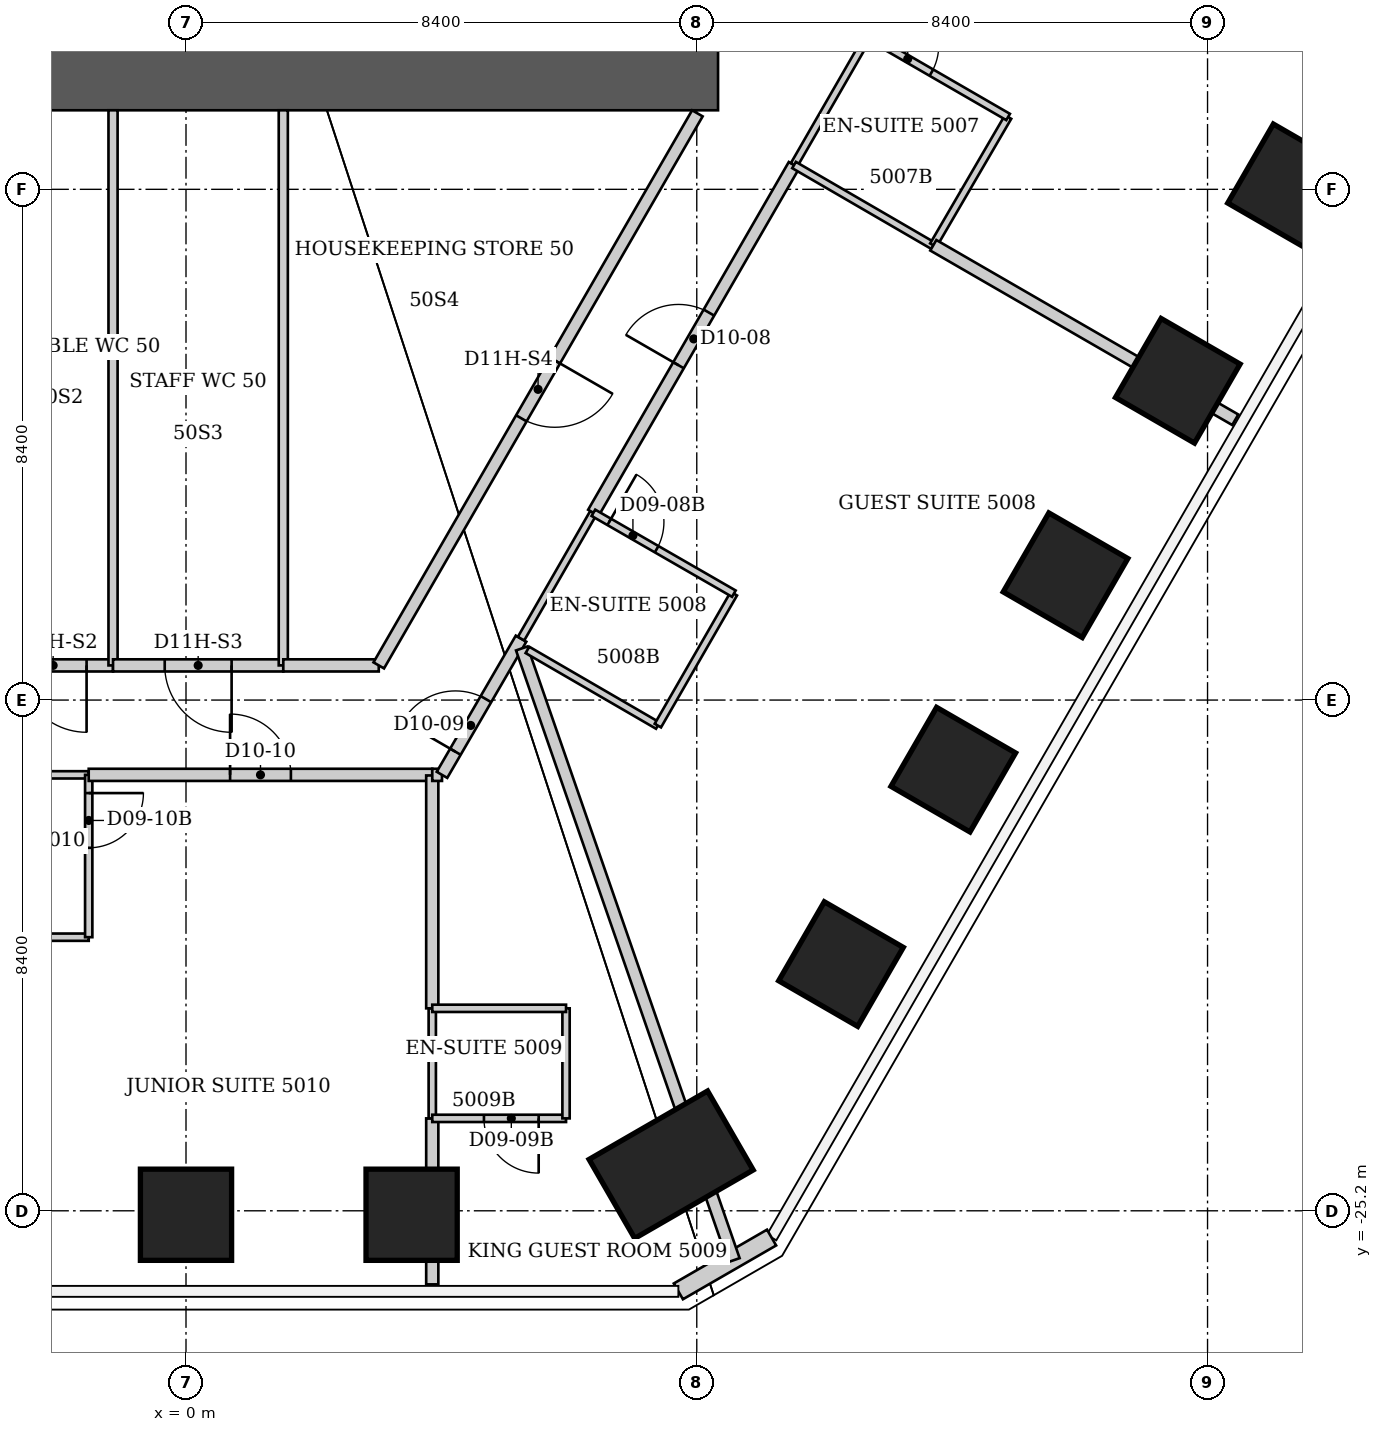
"""IFC4 building model, lengths in metres.
Left out: names, types, materials, properties, quantities, classifications, styles, units other than length and angle.
Written with IfcOpenShell. Run it as: python <this file> out.ifc"""

import sys

from ifc_helpers import new_model, si_unit, direction, frame, frame_2d, origin, origin_2d, place, context, subcontext, project, spatial, rectangle, extrude, element, fill, save


model = new_model("IFC4")
c1 = context("Model", 3, precision=1e-05, world=origin(), true_north=direction((0.0, 1.0)))
c2 = subcontext(c1, "Body", "Model", "MODEL_VIEW")
j1 = project(units=[si_unit("LENGTHUNIT", "METRE"), si_unit("PLANEANGLEUNIT", "RADIAN")], contexts=[c1])
p1 = place(None, origin())
s1 = spatial("IfcSite", under=j1, at=p1, CompositionType="ELEMENT")
p2 = place(p1, origin())
s2 = spatial("IfcBuilding", under=s1, at=p2, CompositionType="ELEMENT")
p3 = place(p2, frame((0.0, 0.0, 202.2)))
s3 = spatial("IfcBuildingStorey", under=s2, at=p3, CompositionType="ELEMENT", Elevation=202.2)
for number, where, z_axis, x_axis in (
    (1, (18.157, -8.351, 0.0), (0.0, 0.0, 1.0), (0.866, -0.5, 0.0)),
    (2, (16.311, -11.549, 0.0), (0.0, 0.0, 1.0), (0.866, -0.5, 0.0)),
    (3, (14.465, -14.747, 0.0), (0.0, 0.0, 1.0), (0.866, -0.5, 0.0)),
    (4, (12.618, -17.945, 0.0), (0.0, 0.0, 1.0), (0.866, -0.5, 0.0)),
    (5, (10.772, -21.142, 0.0), (0.0, 0.0, 1.0), (0.866, -0.5, 0.0)),
):
    element("IfcColumn", number, at=place(p3, frame(where, z_axis=z_axis, x_axis=x_axis)), inside=s3, PredefinedType="COLUMN", context=c2, shape_type="SweptSolid", body=[
        extrude(rectangle(XDim=1.5, YDim=1.5, at=origin_2d()), origin(), (0.0, 0.0, 1.0), 3.8),
    ])
p4 = place(p3, frame((7.979, -24.442, 0.0), z_axis=(0.0, 0.0, 1.0), x_axis=(0.5, -0.866025403784, 0.0)))
e6 = element("IfcColumn", 6, at=p4, inside=s3, PredefinedType="COLUMN", context=c2, shape_type="SweptSolid", body=[
    extrude(rectangle(XDim=1.5, YDim=2.25, at=origin_2d()), origin(), (0.0, 0.0, 1.0), 3.8),
])
for number, where, z_axis, x_axis in (
    (7, (3.71, -25.265, 0.0), (0.0, 0.0, 1.0), (0.0, -1.0, 0.0)),
    (8, (0.0, -25.265, 0.0), (0.0, 0.0, 1.0), (0.0, -1.0, 0.0)),
):
    element("IfcColumn", number, at=place(p3, frame(where, z_axis=z_axis, x_axis=x_axis)), inside=s3, PredefinedType="COLUMN", context=c2, shape_type="SweptSolid", body=[
        extrude(rectangle(XDim=1.5, YDim=1.5, at=origin_2d()), origin(), (0.0, 0.0, 1.0), 3.8),
    ])
p5 = place(p3, frame((-8.75, -6.6, 0.0), z_axis=(0.0, 0.0, 1.0), x_axis=(1.0, 0.0, 0.0)))
e9 = element("IfcWall", 9, at=p5, inside=s3, PredefinedType="SHEAR", context=c2, shape_type="SweptSolid", body=[
    extrude(rectangle(XDim=17.5, YDim=1.0, at=frame_2d((8.75, 0.0))), origin(), (0.0, 0.0, 1.0), 3.8),
])
p6 = place(p3, frame((9.63, -25.64, 0.0), z_axis=(0.0, 0.0, 1.0), x_axis=(-0.866036293601, -0.499981137809, 0.0)))
e10 = element("IfcWall", 10, at=p6, inside=s3, PredefinedType="SOLIDWALL", context=c2, shape_type="SweptSolid", body=[
    extrude(rectangle(XDim=1.77, YDim=0.3, at=frame_2d((0.885, 0.0))), origin(), (0.0, 0.0, 1.0), 3.64),
])
for number, where, z_axis, x_axis in (
    (11, (-4.05, -20.7, 0.0), (0.0, 0.0, 1.0), (1.0, 0.0, 0.0)),
    (12, (-4.05, -18.03, 0.0), (0.0, 0.0, 1.0), (1.0, 0.0, 0.0)),
):
    element("IfcWall", number, at=place(p3, frame(where, z_axis=z_axis, x_axis=x_axis)), inside=s3, PredefinedType="PARTITIONING", context=c2, shape_type="SweptSolid", body=[
        extrude(rectangle(XDim=2.45, YDim=0.12, at=frame_2d((1.225, 0.0))), origin(), (0.0, 0.0, 1.0), 3.64),
    ])
p7 = place(p3, frame((-1.6, -20.7, 0.0), z_axis=(0.0, 0.0, 1.0), x_axis=(0.0, 1.0, 0.0)))
e13 = element("IfcWall", 13, at=p7, inside=s3, PredefinedType="PARTITIONING", context=c2, shape_type="SweptSolid", body=[
    extrude(rectangle(XDim=2.67, YDim=0.12, at=frame_2d((1.335, 0.0))), origin(), (0.0, 0.0, 1.0), 3.64),
])
p8 = place(p7, frame((1.47, 0.0, 0.0)))
e14 = element("IfcOpeningElement", 14, at=p8, cuts=e13, PredefinedType="OPENING", context=c2, shape_type="SweptSolid", body=[
    extrude(rectangle(XDim=0.9, YDim=2.03, at=frame_2d((0.45, 1.015))), frame((0.0, 0.06, 0.0), z_axis=(0.0, -1.0, 0.0), x_axis=(1.0, 0.0, 0.0)), (0.0, 0.0, 1.0), 0.12),
])
p9 = place(p3, frame((-1.6, -18.03, 0.0), z_axis=(0.0, 0.0, 1.0), x_axis=(1.0, 0.0, 0.0)))
e15 = element("IfcWall", 15, at=p9, inside=s3, PredefinedType="PARTITIONING", context=c2, shape_type="SweptSolid", body=[
    extrude(rectangle(XDim=5.65, YDim=0.2, at=frame_2d((2.825, 0.0))), origin(), (0.0, 0.0, 1.0), 3.64),
])
p10 = place(p9, frame((2.325, 0.0, 0.0)))
e16 = element("IfcOpeningElement", 16, at=p10, cuts=e15, PredefinedType="OPENING", context=c2, shape_type="SweptSolid", body=[
    extrude(rectangle(XDim=1.0, YDim=2.13, at=frame_2d((0.5, 1.065))), frame((0.0, 0.1, 0.0), z_axis=(0.0, -1.0, 0.0), x_axis=(1.0, 0.0, 0.0)), (0.0, 0.0, 1.0), 0.2),
])
p11 = place(p3, frame((-1.2, -16.23, 0.0), z_axis=(0.0, 0.0, 1.0), x_axis=(-1.0, 0.0, 0.0)))
e17 = element("IfcWall", 17, at=p11, inside=s3, PredefinedType="PARTITIONING", context=c2, shape_type="SweptSolid", body=[
    extrude(rectangle(XDim=1.97, YDim=0.2, at=frame_2d((0.985, 0.0))), origin(), (0.0, 0.0, 1.0), 3.64),
])
p12 = place(p11, frame((0.435, 0.0, 0.0)))
e18 = element("IfcOpeningElement", 18, at=p12, cuts=e17, PredefinedType="OPENING", context=c2, shape_type="SweptSolid", body=[
    extrude(rectangle(XDim=1.1, YDim=2.2, at=frame_2d((0.55, 1.1))), frame((0.0, 0.1, 0.0), z_axis=(0.0, -1.0, 0.0), x_axis=(1.0, 0.0, 0.0)), (0.0, 0.0, 1.0), 0.2),
])
p13 = place(p3, frame((-1.2, -7.1, 0.0), z_axis=(0.0, 0.0, 1.0), x_axis=(0.0, -1.0, 0.0)))
e19 = element("IfcWall", 19, at=p13, inside=s3, PredefinedType="PARTITIONING", context=c2, shape_type="SweptSolid", body=[
    extrude(rectangle(XDim=9.13, YDim=0.15, at=frame_2d((4.565, 0.0))), origin(), (0.0, 0.0, 1.0), 3.64),
])
p14 = place(p3, frame((1.6, -16.23, 0.0), z_axis=(0.0, 0.0, 1.0), x_axis=(-1.0, 0.0, 0.0)))
e20 = element("IfcWall", 20, at=p14, inside=s3, PredefinedType="PARTITIONING", context=c2, shape_type="SweptSolid", body=[
    extrude(rectangle(XDim=2.8, YDim=0.2, at=frame_2d((1.4, 0.0))), origin(), (0.0, 0.0, 1.0), 3.64),
])
p15 = place(p14, frame((0.85, 0.0, 0.0)))
e21 = element("IfcOpeningElement", 21, at=p15, cuts=e20, PredefinedType="OPENING", context=c2, shape_type="SweptSolid", body=[
    extrude(rectangle(XDim=1.1, YDim=2.2, at=frame_2d((0.55, 1.1))), frame((0.0, 0.1, 0.0), z_axis=(0.0, -1.0, 0.0), x_axis=(1.0, 0.0, 0.0)), (0.0, 0.0, 1.0), 0.2),
])
p16 = place(p3, frame((1.6, -7.1, 0.0), z_axis=(0.0, 0.0, 1.0), x_axis=(0.0, -1.0, 0.0)))
e22 = element("IfcWall", 22, at=p16, inside=s3, PredefinedType="PARTITIONING", context=c2, shape_type="SweptSolid", body=[
    extrude(rectangle(XDim=9.13, YDim=0.15, at=frame_2d((4.565, 0.0))), origin(), (0.0, 0.0, 1.0), 3.64),
])
p17 = place(p3, frame((3.17, -16.23, 0.0), z_axis=(0.0, 0.0, 1.0), x_axis=(-1.0, 0.0, 0.0)))
e23 = element("IfcWall", 23, at=p17, inside=s3, PredefinedType="PARTITIONING", context=c2, shape_type="SweptSolid", body=[
    extrude(rectangle(XDim=1.57, YDim=0.2, at=frame_2d((0.785, 0.0))), origin(), (0.0, 0.0, 1.0), 3.64),
])
p18 = place(p3, frame((4.05, -26.41, 0.0), z_axis=(0.0, 0.0, 1.0), x_axis=(0.0, 1.0, 0.0)))
e24 = element("IfcWall", 24, at=p18, inside=s3, PredefinedType="PARTITIONING", context=c2, shape_type="SweptSolid", body=[
    extrude(rectangle(XDim=2.73, YDim=0.2, at=frame_2d((1.365, 0.0))), origin(), (0.0, 0.0, 1.0), 3.64),
])
p19 = place(p3, frame((4.05, -23.68, 0.0), z_axis=(0.0, 0.0, 1.0), x_axis=(0.0, 1.0, 0.0)))
e25 = element("IfcWall", 25, at=p19, inside=s3, PredefinedType="PARTITIONING", context=c2, shape_type="SweptSolid", body=[
    extrude(rectangle(XDim=1.81, YDim=0.12, at=frame_2d((0.905, 0.0))), origin(), (0.0, 0.0, 1.0), 3.64),
])
p20 = place(p3, frame((4.05, -23.68, 0.0), z_axis=(0.0, 0.0, 1.0), x_axis=(1.0, 0.0, 0.0)))
e26 = element("IfcWall", 26, at=p20, inside=s3, PredefinedType="PARTITIONING", context=c2, shape_type="SweptSolid", body=[
    extrude(rectangle(XDim=2.2, YDim=0.12, at=frame_2d((1.1, 0.0))), origin(), (0.0, 0.0, 1.0), 3.64),
])
p21 = place(p20, frame((0.85, 0.0, 0.0)))
e27 = element("IfcOpeningElement", 27, at=p21, cuts=e26, PredefinedType="OPENING", context=c2, shape_type="SweptSolid", body=[
    extrude(rectangle(XDim=0.9, YDim=2.03, at=frame_2d((0.45, 1.015))), frame((0.0, 0.06, 0.0), z_axis=(0.0, -1.0, 0.0), x_axis=(1.0, 0.0, 0.0)), (0.0, 0.0, 1.0), 0.12),
])
p22 = place(p3, frame((4.05, -21.87, 0.0), z_axis=(0.0, 0.0, 1.0), x_axis=(0.0, 1.0, 0.0)))
e28 = element("IfcWall", 28, at=p22, inside=s3, PredefinedType="PARTITIONING", context=c2, shape_type="SweptSolid", body=[
    extrude(rectangle(XDim=3.83, YDim=0.2, at=frame_2d((1.915, 0.0))), origin(), (0.0, 0.0, 1.0), 3.64),
])
p23 = place(p3, frame((4.05, -18.03, 0.0), z_axis=(0.0, 0.0, 1.0), x_axis=(1.0, 0.0, 0.0)))
e29 = element("IfcWall", 29, at=p23, inside=s3, PredefinedType="PARTITIONING", context=c2, shape_type="SweptSolid", body=[
    extrude(rectangle(XDim=0.16, YDim=0.2, at=frame_2d((0.08, 0.0))), origin(), (0.0, 0.0, 1.0), 3.64),
])
p24 = place(p3, frame((5.51, -15.79, 0.0), z_axis=(0.0, 0.0, 1.0), x_axis=(-0.501964949025, -0.864887963814, 0.0)))
e30 = element("IfcWall", 30, at=p24, inside=s3, PredefinedType="PARTITIONING", context=c2, shape_type="SweptSolid", body=[
    extrude(rectangle(XDim=2.59, YDim=0.2, at=frame_2d((1.295, 0.0))), origin(), (0.0, 0.0, 1.0), 3.64),
])
p25 = place(p24, frame((1.15, 0.0, 0.0)))
e31 = element("IfcOpeningElement", 31, at=p25, cuts=e30, PredefinedType="OPENING", context=c2, shape_type="SweptSolid", body=[
    extrude(rectangle(XDim=1.0, YDim=2.13, at=frame_2d((0.5, 1.065))), frame((0.0, 0.1, 0.0), z_axis=(0.0, -1.0, 0.0), x_axis=(1.0, 0.0, 0.0)), (0.0, 0.0, 1.0), 0.2),
])
p26 = place(p3, frame((5.51, -15.79, 0.0), z_axis=(0.0, 0.0, 1.0), x_axis=(0.49836161924, 0.866969259241, 0.0)))
e32 = element("IfcWall", 32, at=p26, inside=s3, PredefinedType="PARTITIONING", context=c2, shape_type="SweptSolid", body=[
    extrude(rectangle(XDim=2.388, YDim=0.12, at=frame_2d((1.194, 0.0))), origin(), (0.0, 0.0, 1.0), 3.64),
])
p27 = place(p3, frame((5.522, -15.951, 0.0), z_axis=(0.0, 0.0, 1.0), x_axis=(0.327588517074, -0.944820492729, 0.0)))
e33 = element("IfcWall", 33, at=p27, inside=s3, PredefinedType="PARTITIONING", context=c2, shape_type="SweptSolid", body=[
    extrude(rectangle(XDim=10.648, YDim=0.2, at=frame_2d((5.324, 0.0))), origin(), (0.0, 0.0, 1.0), 3.64),
])
p28 = place(p3, frame((5.615, -15.975, 0.0), z_axis=(0.0, 0.0, 1.0), x_axis=(0.864873056518, -0.501990633487, 0.0)))
e34 = element("IfcWall", 34, at=p28, inside=s3, PredefinedType="PARTITIONING", context=c2, shape_type="SweptSolid", body=[
    extrude(rectangle(XDim=2.48, YDim=0.12, at=frame_2d((1.24, 0.0))), origin(), (0.0, 0.0, 1.0), 3.038),
])
p29 = place(p3, frame((6.25, -23.68, 0.0), z_axis=(0.0, 0.0, 1.0), x_axis=(0.0, 1.0, 0.0)))
e35 = element("IfcWall", 35, at=p29, inside=s3, PredefinedType="PARTITIONING", context=c2, shape_type="SweptSolid", body=[
    extrude(rectangle(XDim=1.81, YDim=0.12, at=frame_2d((0.905, 0.0))), origin(), (0.0, 0.0, 1.0), 3.64),
])
p30 = place(p3, frame((6.25, -21.87, 0.0), z_axis=(0.0, 0.0, 1.0), x_axis=(-1.0, 0.0, 0.0)))
e36 = element("IfcWall", 36, at=p30, inside=s3, PredefinedType="PARTITIONING", context=c2, shape_type="SweptSolid", body=[
    extrude(rectangle(XDim=2.2, YDim=0.12, at=frame_2d((1.1, 0.0))), origin(), (0.0, 0.0, 1.0), 3.64),
])
p31 = place(p3, frame((6.7, -13.72, 0.0), z_axis=(0.0, 0.0, 1.0), x_axis=(0.499729921425, 0.866181277581, 0.0)))
e37 = element("IfcWall", 37, at=p31, inside=s3, PredefinedType="PARTITIONING", context=c2, shape_type="SweptSolid", body=[
    extrude(rectangle(XDim=6.604, YDim=0.2, at=frame_2d((3.302, 0.0))), origin(), (0.0, 0.0, 1.0), 3.64),
])
p32 = place(p31, frame((2.802, 0.0, 0.0)))
e38 = element("IfcOpeningElement", 38, at=p32, cuts=e37, PredefinedType="OPENING", context=c2, shape_type="SweptSolid", body=[
    extrude(rectangle(XDim=1.0, YDim=2.13, at=frame_2d((0.5, 1.065))), frame((0.0, 0.1, 0.0), z_axis=(0.0, -1.0, 0.0), x_axis=(1.0, 0.0, 0.0)), (0.0, 0.0, 1.0), 0.2),
])
p33 = place(p3, frame((7.76, -17.22, 0.0), z_axis=(0.0, 0.0, 1.0), x_axis=(0.499159685399, 0.866510016372, 0.0)))
e39 = element("IfcWall", 39, at=p33, inside=s3, PredefinedType="PARTITIONING", context=c2, shape_type="SweptSolid", body=[
    extrude(rectangle(XDim=2.504, YDim=0.12, at=frame_2d((1.252, 0.0))), origin(), (0.0, 0.0, 1.0), 3.64),
])
p34 = place(p3, frame((8.41, -7.15, 0.0), z_axis=(0.0, 0.0, 1.0), x_axis=(-0.499828628176, -0.866124322748, 0.0)))
e40 = element("IfcWall", 40, at=p34, inside=s3, PredefinedType="PARTITIONING", context=c2, shape_type="SweptSolid", body=[
    extrude(rectangle(XDim=10.484, YDim=0.2, at=frame_2d((5.242, 0.0))), origin(), (0.0, 0.0, 1.0), 3.64),
])
p35 = place(p34, frame((4.692, 0.0, 0.0)))
e41 = element("IfcOpeningElement", 41, at=p35, cuts=e40, PredefinedType="OPENING", context=c2, shape_type="SweptSolid", body=[
    extrude(rectangle(XDim=1.1, YDim=2.2, at=frame_2d((0.55, 1.1))), frame((0.0, 0.1, 0.0), z_axis=(0.0, -1.0, 0.0), x_axis=(1.0, 0.0, 0.0)), (0.0, 0.0, 1.0), 0.2),
])
p36 = place(p3, frame((9.01, -15.05, 0.0), z_axis=(0.0, 0.0, 1.0), x_axis=(-0.866615255992, 0.498976951453, 0.0)))
e42 = element("IfcWall", 42, at=p36, inside=s3, PredefinedType="PARTITIONING", context=c2, shape_type="SweptSolid", body=[
    extrude(rectangle(XDim=2.666, YDim=0.12, at=frame_2d((1.333, 0.0))), origin(), (0.0, 0.0, 1.0), 3.64),
])
p37 = place(p36, frame((1.466, 0.0, 0.0)))
e43 = element("IfcOpeningElement", 43, at=p37, cuts=e42, PredefinedType="OPENING", context=c2, shape_type="SweptSolid", body=[
    extrude(rectangle(XDim=0.9, YDim=2.03, at=frame_2d((0.45, 1.015))), frame((0.0, 0.06, 0.0), z_axis=(0.0, -1.0, 0.0), x_axis=(1.0, 0.0, 0.0)), (0.0, 0.0, 1.0), 0.12),
])
p38 = place(p3, frame((9.999, -8.0, 0.0), z_axis=(0.0, 0.0, 1.0), x_axis=(0.49917796633, 0.866499485245, 0.0)))
e44 = element("IfcWall", 44, at=p38, inside=s3, PredefinedType="PARTITIONING", context=c2, shape_type="SweptSolid", body=[
    extrude(rectangle(XDim=2.446, YDim=0.12, at=frame_2d((1.223, 0.0))), origin(), (0.0, 0.0, 1.0), 3.64),
])
p39 = place(p3, frame((12.29, -9.33, 0.0), z_axis=(0.0, 0.0, 1.0), x_axis=(-0.864726954997, 0.502242265546, 0.0)))
e45 = element("IfcWall", 45, at=p39, inside=s3, PredefinedType="PARTITIONING", context=c2, shape_type="SweptSolid", body=[
    extrude(rectangle(XDim=2.648, YDim=0.12, at=frame_2d((1.324, 0.0))), origin(), (0.0, 0.0, 1.0), 3.038),
])
p40 = place(p3, frame((12.29, -9.32, 0.0), z_axis=(0.0, 0.0, 1.0), x_axis=(0.503591322258, 0.863942000453, 0.0)))
e46 = element("IfcWall", 46, at=p40, inside=s3, PredefinedType="PARTITIONING", context=c2, shape_type="SweptSolid", body=[
    extrude(rectangle(XDim=2.442, YDim=0.12, at=frame_2d((1.221, 0.0))), origin(), (0.0, 0.0, 1.0), 3.64),
])
p41 = place(p3, frame((12.29, -9.32, 0.0), z_axis=(0.0, 0.0, 1.0), x_axis=(0.865820408554, -0.500354894182, 0.0)))
e47 = element("IfcWall", 47, at=p41, inside=s3, PredefinedType="PARTITIONING", context=c2, shape_type="SweptSolid", body=[
    extrude(rectangle(XDim=5.736, YDim=0.2, at=frame_2d((2.868, 0.0))), origin(), (0.0, 0.0, 1.0), 3.038),
])
p42 = place(p3, frame((13.52, -7.21, 0.0), z_axis=(0.0, 0.0, 1.0), x_axis=(-0.865675724273, 0.500605174168, 0.0)))
e48 = element("IfcWall", 48, at=p42, inside=s3, PredefinedType="PARTITIONING", context=c2, shape_type="SweptSolid", body=[
    extrude(rectangle(XDim=2.657, YDim=0.12, at=frame_2d((1.329, 0.0))), origin(), (0.0, 0.0, 1.0), 3.64),
])
p43 = place(p42, frame((1.457, 0.0, 0.0)))
e49 = element("IfcOpeningElement", 49, at=p43, cuts=e48, PredefinedType="OPENING", context=c2, shape_type="SweptSolid", body=[
    extrude(rectangle(XDim=0.9, YDim=2.03, at=frame_2d((0.45, 1.015))), frame((0.0, 0.06, 0.0), z_axis=(0.0, -1.0, 0.0), x_axis=(1.0, 0.0, 0.0)), (0.0, 0.0, 1.0), 0.12),
])
p44 = place(p43, origin())
e50 = element("IfcDoor", 50, at=p44, inside=s3, OperationType="SINGLE_SWING_RIGHT", PredefinedType="DOOR", context=c2, shape_type="SweptSolid", body=[
    extrude(rectangle(XDim=0.9, YDim=2.03, at=frame_2d((0.45, 1.015))), frame((0.0, 0.025, 0.0), z_axis=(0.0, -1.0, 0.0), x_axis=(1.0, 0.0, 0.0)), (0.0, 0.0, 1.0), 0.05),
])
fill(e49, e50)
p45 = place(p32, origin())
e51 = element("IfcDoor", 51, at=p45, inside=s3, OperationType="SINGLE_SWING_LEFT", PredefinedType="DOOR", context=c2, shape_type="SweptSolid", body=[
    extrude(rectangle(XDim=1.0, YDim=2.13, at=frame_2d((0.5, 1.065))), frame((0.0, 0.025, 0.0), z_axis=(0.0, -1.0, 0.0), x_axis=(1.0, 0.0, 0.0)), (0.0, 0.0, 1.0), 0.05),
])
fill(e38, e51)
p46 = place(p37, origin())
e52 = element("IfcDoor", 52, at=p46, inside=s3, OperationType="SINGLE_SWING_RIGHT", PredefinedType="DOOR", context=c2, shape_type="SweptSolid", body=[
    extrude(rectangle(XDim=0.9, YDim=2.03, at=frame_2d((0.45, 1.015))), frame((0.0, 0.025, 0.0), z_axis=(0.0, -1.0, 0.0), x_axis=(1.0, 0.0, 0.0)), (0.0, 0.0, 1.0), 0.05),
])
fill(e43, e52)
p47 = place(p25, origin())
e53 = element("IfcDoor", 53, at=p47, inside=s3, OperationType="SINGLE_SWING_RIGHT", PredefinedType="DOOR", context=c2, shape_type="SweptSolid", body=[
    extrude(rectangle(XDim=1.0, YDim=2.13, at=frame_2d((0.5, 1.065))), frame((0.0, 0.025, 0.0), z_axis=(0.0, -1.0, 0.0), x_axis=(1.0, 0.0, 0.0)), (0.0, 0.0, 1.0), 0.05),
])
fill(e31, e53)
p48 = place(p21, origin())
e54 = element("IfcDoor", 54, at=p48, inside=s3, OperationType="SINGLE_SWING_RIGHT", PredefinedType="DOOR", context=c2, shape_type="SweptSolid", body=[
    extrude(rectangle(XDim=0.9, YDim=2.03, at=frame_2d((0.45, 1.015))), frame((0.0, 0.025, 0.0), z_axis=(0.0, -1.0, 0.0), x_axis=(1.0, 0.0, 0.0)), (0.0, 0.0, 1.0), 0.05),
])
fill(e27, e54)
p49 = place(p10, origin())
e55 = element("IfcDoor", 55, at=p49, inside=s3, OperationType="SINGLE_SWING_LEFT", PredefinedType="DOOR", context=c2, shape_type="SweptSolid", body=[
    extrude(rectangle(XDim=1.0, YDim=2.13, at=frame_2d((0.5, 1.065))), frame((0.0, 0.025, 0.0), z_axis=(0.0, -1.0, 0.0), x_axis=(1.0, 0.0, 0.0)), (0.0, 0.0, 1.0), 0.05),
])
fill(e16, e55)
p50 = place(p8, origin())
e56 = element("IfcDoor", 56, at=p50, inside=s3, OperationType="SINGLE_SWING_RIGHT", PredefinedType="DOOR", context=c2, shape_type="SweptSolid", body=[
    extrude(rectangle(XDim=0.9, YDim=2.03, at=frame_2d((0.45, 1.015))), frame((0.0, 0.025, 0.0), z_axis=(0.0, -1.0, 0.0), x_axis=(1.0, 0.0, 0.0)), (0.0, 0.0, 1.0), 0.05),
])
fill(e14, e56)
p51 = place(p12, origin())
e57 = element("IfcDoor", 57, at=p51, inside=s3, OperationType="SINGLE_SWING_LEFT", PredefinedType="DOOR", context=c2, shape_type="SweptSolid", body=[
    extrude(rectangle(XDim=1.1, YDim=2.2, at=frame_2d((0.55, 1.1))), frame((0.0, 0.025, 0.0), z_axis=(0.0, -1.0, 0.0), x_axis=(1.0, 0.0, 0.0)), (0.0, 0.0, 1.0), 0.05),
])
fill(e18, e57)
p52 = place(p15, origin())
e58 = element("IfcDoor", 58, at=p52, inside=s3, OperationType="SINGLE_SWING_LEFT", PredefinedType="DOOR", context=c2, shape_type="SweptSolid", body=[
    extrude(rectangle(XDim=1.1, YDim=2.2, at=frame_2d((0.55, 1.1))), frame((0.0, 0.025, 0.0), z_axis=(0.0, -1.0, 0.0), x_axis=(1.0, 0.0, 0.0)), (0.0, 0.0, 1.0), 0.05),
])
fill(e21, e58)
p53 = place(p35, origin())
e59 = element("IfcDoor", 59, at=p53, inside=s3, OperationType="SINGLE_SWING_LEFT", PredefinedType="DOOR", context=c2, shape_type="SweptSolid", body=[
    extrude(rectangle(XDim=1.1, YDim=2.2, at=frame_2d((0.55, 1.1))), frame((0.0, 0.025, 0.0), z_axis=(0.0, -1.0, 0.0), x_axis=(1.0, 0.0, 0.0)), (0.0, 0.0, 1.0), 0.05),
])
fill(e41, e59)
save(model, sys.argv[1])
